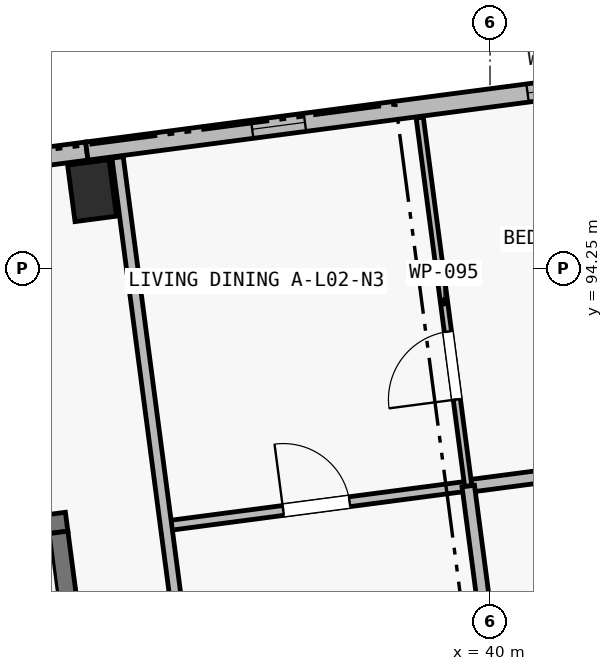
"""IFC4 building model, lengths in metres.
Left out: names, types, materials, properties, quantities, classifications, styles, units other than length and angle.
Written with IfcOpenShell. Run it as: python <this file> out.ifc"""

import sys

from ifc_helpers import new_model, si_unit, direction, frame, frame_2d, origin, origin_2d, place, context, subcontext, project, spatial, rectangle, extrude, element, fill, save


model = new_model("IFC4")
c1 = context("Model", 3, precision=1e-05, world=origin(), true_north=direction((0.0, 1.0)))
c2 = subcontext(c1, "Body", "Model", "MODEL_VIEW")
j1 = project(units=[si_unit("LENGTHUNIT", "METRE"), si_unit("PLANEANGLEUNIT", "RADIAN")], contexts=[c1])
p1 = place(None, origin())
s1 = spatial("IfcSite", under=j1, at=p1, CompositionType="ELEMENT")
p2 = place(p1, origin())
s2 = spatial("IfcBuilding", under=s1, at=p2, CompositionType="ELEMENT")
p3 = place(p2, frame((0.0, 0.0, 8.4)))
s3 = spatial("IfcBuildingStorey", under=s2, at=p3, CompositionType="ELEMENT", Elevation=8.4)
p4 = place(p3, frame((34.764, 95.275, 0.0), z_axis=(0.0, 0.0, 1.0), x_axis=(0.991444861374, 0.13052619222, 0.0)))
e1 = element("IfcColumn", 1, at=p4, inside=s3, PredefinedType="COLUMN", context=c2, shape_type="SweptSolid", body=[
    extrude(rectangle(XDim=0.55, YDim=0.75, at=origin_2d()), origin(), (0.0, 0.0, 1.0), 3.25),
])
p5 = place(p3, frame((27.489, 90.005, 0.0), z_axis=(0.0, 0.0, 1.0), x_axis=(0.991441944909, 0.130548343059, 0.0)))
e2 = element("IfcWall", 2, at=p5, inside=s3, PredefinedType="SHEAR", context=c2, shape_type="SweptSolid", body=[
    extrude(rectangle(XDim=7.0, YDim=0.25, at=frame_2d((3.5, 0.0))), origin(), (0.0, 0.0, 1.0), 3.25),
])
p6 = place(p5, frame((0.45, 0.0, 0.0)))
e3 = element("IfcOpeningElement", 3, at=p6, cuts=e2, PredefinedType="OPENING", context=c2, shape_type="SweptSolid", body=[
    extrude(rectangle(XDim=0.9, YDim=2.1, at=frame_2d((0.45, 1.05))), frame((0.0, 0.14, 0.0), z_axis=(0.0, -1.0, 0.0), x_axis=(1.0, 0.0, 0.0)), (0.0, 0.0, 1.0), 0.28),
])
p7 = place(p3, frame((34.694, 87.953, 0.0), z_axis=(0.0, 0.0, 1.0), x_axis=(-0.130474457355, 0.991451671025, 0.0)))
e4 = element("IfcWall", 4, at=p7, inside=s3, PredefinedType="SHEAR", context=c2, shape_type="SweptSolid", body=[
    extrude(rectangle(XDim=2.85, YDim=0.25, at=frame_2d((1.425, 0.0))), origin(), (0.0, 0.0, 1.0), 3.25),
])
p8 = place(p3, frame((31.746, 95.407, 0.0), z_axis=(0.0, 0.0, 1.0), x_axis=(0.991439484875, 0.130567024289, 0.0)))
e5 = element("IfcWall", 5, at=p8, inside=s3, PredefinedType="SOLIDWALL", context=c2, shape_type="SweptSolid", body=[
    extrude(rectangle(XDim=2.975, YDim=0.24, at=frame_2d((1.487, 0.0))), origin(), (0.0, 0.0, 1.0), 3.0),
])
p9 = place(p3, frame((34.695, 95.795, 0.0), z_axis=(0.0, 0.0, 1.0), x_axis=(0.991447967712, 0.130502595073, 0.0)))
e6 = element("IfcWall", 6, at=p9, inside=s3, PredefinedType="SOLIDWALL", context=c2, shape_type="SweptSolid", body=[
    extrude(rectangle(XDim=8.8, YDim=0.24, at=frame_2d((4.4, 0.0))), origin(), (0.0, 0.0, 1.0), 3.0),
])
p10 = place(p9, frame((2.194, 0.0, 0.5)))
e7 = element("IfcOpeningElement", 7, at=p10, cuts=e6, PredefinedType="OPENING", context=c2, shape_type="SweptSolid", body=[
    extrude(rectangle(XDim=0.7, YDim=2.36, at=frame_2d((0.35, 1.18))), frame((0.0, 0.135, 0.0), z_axis=(0.0, -1.0, 0.0), x_axis=(1.0, 0.0, 0.0)), (0.0, 0.0, 1.0), 0.27),
])
p11 = place(p9, frame((5.849, 0.0, 0.44)))
e8 = element("IfcOpeningElement", 8, at=p11, cuts=e6, PredefinedType="OPENING", context=c2, shape_type="SweptSolid", body=[
    extrude(rectangle(XDim=0.78, YDim=2.2, at=frame_2d((0.39, 1.1))), frame((0.0, 0.135, 0.0), z_axis=(0.0, -1.0, 0.0), x_axis=(1.0, 0.0, 0.0)), (0.0, 0.0, 1.0), 0.27),
])
p12 = place(p3, frame((35.738, 90.864, 0.0), z_axis=(0.0, 0.0, 1.0), x_axis=(0.991444553502, 0.130528530716, 0.0)))
e9 = element("IfcWall", 9, at=p12, inside=s3, PredefinedType="PARTITIONING", context=c2, shape_type="SweptSolid", body=[
    extrude(rectangle(XDim=4.01, YDim=0.13, at=frame_2d((2.005, 0.0))), origin(), (0.0, 0.0, 1.0), 2.97),
])
p13 = place(p12, frame((1.555, 0.0, 0.0)))
e10 = element("IfcOpeningElement", 10, at=p13, cuts=e9, PredefinedType="OPENING", context=c2, shape_type="SweptSolid", body=[
    extrude(rectangle(XDim=0.88, YDim=2.1, at=frame_2d((0.44, 1.05))), frame((0.0, 0.08, 0.0), z_axis=(0.0, -1.0, 0.0), x_axis=(1.0, 0.0, 0.0)), (0.0, 0.0, 1.0), 0.16),
])
p14 = place(p3, frame((39.713, 91.388, 0.0), z_axis=(0.0, 0.0, 1.0), x_axis=(0.991443516139, 0.130536409887, 0.0)))
e11 = element("IfcWall", 11, at=p14, inside=s3, PredefinedType="PLUMBINGWALL", context=c2, shape_type="SweptSolid", body=[
    extrude(rectangle(XDim=4.01, YDim=0.165, at=frame_2d((2.005, 0.0))), origin(), (0.0, 0.0, 1.0), 2.97),
])
p15 = place(p14, frame((1.595, 0.0, 0.0)))
e12 = element("IfcOpeningElement", 12, at=p15, cuts=e11, PredefinedType="OPENING", context=c2, shape_type="SweptSolid", body=[
    extrude(rectangle(XDim=0.82, YDim=2.08, at=frame_2d((0.41, 1.04))), frame((0.0, 0.097, 0.0), z_axis=(0.0, -1.0, 0.0), x_axis=(1.0, 0.0, 0.0)), (0.0, 0.0, 1.0), 0.195),
])
p16 = place(p3, frame((39.713, 91.388, 0.0), z_axis=(0.0, 0.0, 1.0), x_axis=(-0.130557831536, 0.991440695465, 0.0)))
e13 = element("IfcWall", 13, at=p16, inside=s3, PredefinedType="PARTITIONING", context=c2, shape_type="SweptSolid", body=[
    extrude(rectangle(XDim=4.89, YDim=0.095, at=frame_2d((2.445, 0.0))), origin(), (0.0, 0.0, 1.0), 2.97),
])
p17 = place(p16, frame((1.15, 0.0, 0.0)))
e14 = element("IfcOpeningElement", 14, at=p17, cuts=e13, PredefinedType="OPENING", context=c2, shape_type="SweptSolid", body=[
    extrude(rectangle(XDim=0.9, YDim=2.1, at=frame_2d((0.45, 1.05))), frame((0.0, 0.062, 0.0), z_axis=(0.0, -1.0, 0.0), x_axis=(1.0, 0.0, 0.0)), (0.0, 0.0, 1.0), 0.125),
])
p18 = place(p3, frame((40.389, 86.252, 0.0), z_axis=(0.0, 0.0, 1.0), x_axis=(-0.130505718023, 0.991447556638, 0.0)))
e15 = element("IfcWall", 15, at=p18, inside=s3, PredefinedType="PLUMBINGWALL", context=c2, shape_type="SweptSolid", body=[
    extrude(rectangle(XDim=5.18, YDim=0.165, at=frame_2d((2.59, 0.0))), origin(), (0.0, 0.0, 1.0), 2.97),
])
p19 = place(p3, frame((36.414, 85.729, 0.0), z_axis=(0.0, 0.0, 1.0), x_axis=(-0.130531024319, 0.991444225204, 0.0)))
e16 = element("IfcWall", 16, at=p19, inside=s3, PredefinedType="PARTITIONING", context=c2, shape_type="SweptSolid", body=[
    extrude(rectangle(XDim=10.07, YDim=0.15, at=frame_2d((5.035, 0.0))), origin(), (0.0, 0.0, 1.0), 2.97),
])
p20 = place(p10, origin())
e17 = element("IfcWindow", 17, at=p20, inside=s3, PartitioningType="SINGLE_PANEL", PredefinedType="WINDOW", context=c2, shape_type="SweptSolid", body=[
    extrude(rectangle(XDim=0.7, YDim=2.36, at=frame_2d((0.35, 1.18))), frame((0.0, 0.03, 0.0), z_axis=(0.0, -1.0, 0.0), x_axis=(1.0, 0.0, 0.0)), (0.0, 0.0, 1.0), 0.06),
])
fill(e7, e17)
p21 = place(p11, origin())
e18 = element("IfcWindow", 18, at=p21, inside=s3, PartitioningType="SINGLE_PANEL", PredefinedType="WINDOW", context=c2, shape_type="SweptSolid", body=[
    extrude(rectangle(XDim=0.78, YDim=2.2, at=frame_2d((0.39, 1.1))), frame((0.0, 0.03, 0.0), z_axis=(0.0, -1.0, 0.0), x_axis=(1.0, 0.0, 0.0)), (0.0, 0.0, 1.0), 0.06),
])
fill(e8, e18)
p22 = place(p13, origin())
e19 = element("IfcDoor", 19, at=p22, inside=s3, OperationType="SINGLE_SWING_LEFT", PredefinedType="DOOR", context=c2, shape_type="SweptSolid", body=[
    extrude(rectangle(XDim=0.88, YDim=2.1, at=frame_2d((0.44, 1.05))), frame((0.0, 0.025, 0.0), z_axis=(0.0, -1.0, 0.0), x_axis=(1.0, 0.0, 0.0)), (0.0, 0.0, 1.0), 0.05),
])
fill(e10, e19)
p23 = place(p17, origin())
e20 = element("IfcDoor", 20, at=p23, inside=s3, OperationType="SINGLE_SWING_LEFT", PredefinedType="DOOR", context=c2, shape_type="SweptSolid", body=[
    extrude(rectangle(XDim=0.9, YDim=2.1, at=frame_2d((0.45, 1.05))), frame((0.0, 0.025, 0.0), z_axis=(0.0, -1.0, 0.0), x_axis=(1.0, 0.0, 0.0)), (0.0, 0.0, 1.0), 0.05),
])
fill(e14, e20)
save(model, sys.argv[1])
